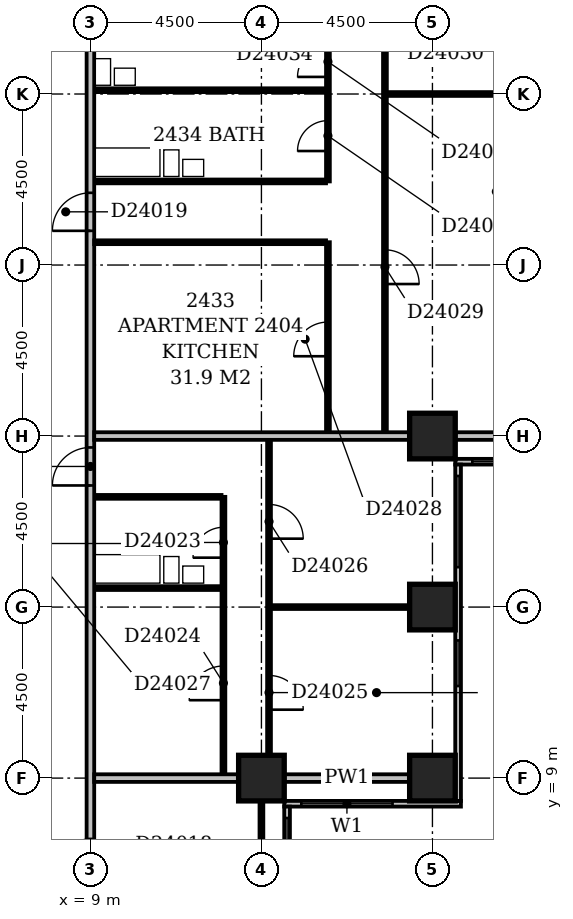
"""IFC4 building model, lengths in metres.
Left out: names, types, materials, properties, quantities, classifications, styles, units other than length and angle.
Written with IfcOpenShell. Run it as: python <this file> out.ifc"""

import sys

from ifc_helpers import new_model, si_unit, direction, frame, frame_2d, origin, origin_2d, place, context, subcontext, project, spatial, rectangle, extrude, element, fill, save


model = new_model("IFC4")
c1 = context("Model", 3, precision=1e-05, world=origin(), true_north=direction((0.0, 1.0)))
c2 = subcontext(c1, "Body", "Model", "MODEL_VIEW")
j1 = project(units=[si_unit("LENGTHUNIT", "METRE"), si_unit("PLANEANGLEUNIT", "RADIAN")], contexts=[c1])
p1 = place(None, origin())
s1 = spatial("IfcSite", under=j1, at=p1, CompositionType="ELEMENT")
p2 = place(p1, origin())
s2 = spatial("IfcBuilding", under=s1, at=p2, CompositionType="ELEMENT")
p3 = place(p2, frame((0.0, 0.0, 97.4)))
s3 = spatial("IfcBuildingStorey", under=s2, at=p3, CompositionType="ELEMENT", Elevation=97.4)
for number, where, z_axis, x_axis in (
    (1, (13.5, 9.0, -0.3), (0.0, 0.0, 1.0), (1.0, 0.0, 0.0)),
    (2, (18.0, 9.0, -0.3), (0.0, 0.0, 1.0), (1.0, 0.0, 0.0)),
    (3, (18.0, 13.5, -0.3), (0.0, 0.0, 1.0), (1.0, 0.0, 0.0)),
    (4, (18.0, 18.0, -0.3), (0.0, 0.0, 1.0), (1.0, 0.0, 0.0)),
):
    element("IfcColumn", number, at=place(p3, frame(where, z_axis=z_axis, x_axis=x_axis)), inside=s3, PredefinedType="COLUMN", context=c2, shape_type="SweptSolid", body=[
        extrude(rectangle(XDim=1.2, YDim=1.2, at=origin_2d()), origin(), (0.0, 0.0, 1.0), 3.6),
    ])
p4 = place(p3, frame((14.175, 3.9, 0.0), z_axis=(0.0, 0.0, 1.0), x_axis=(0.0, 1.0, 0.0)))
e5 = element("IfcWall", 5, at=p4, inside=s3, PredefinedType="STANDARD", context=c2, shape_type="SweptSolid", body=[
    extrude(rectangle(XDim=4.35, YDim=0.15, at=frame_2d((2.175, 0.0))), origin(), (0.0, 0.0, 1.0), 2.7),
])
p5 = place(p4, frame((1.65, 0.0, 0.6)))
e6 = element("IfcOpeningElement", 6, at=p5, cuts=e5, PredefinedType="OPENING", context=c2, shape_type="SweptSolid", body=[
    extrude(rectangle(XDim=2.4, YDim=1.8, at=frame_2d((1.2, 0.9))), frame((0.0, 0.087, 0.0), z_axis=(0.0, -1.0, 0.0), x_axis=(1.0, 0.0, 0.0)), (0.0, 0.0, 1.0), 0.174),
])
p6 = place(p3, frame((14.1, 8.325, 0.0), z_axis=(0.0, 0.0, 1.0), x_axis=(1.0, 0.0, 0.0)))
e7 = element("IfcWall", 7, at=p6, inside=s3, PredefinedType="STANDARD", context=c2, shape_type="SweptSolid", body=[
    extrude(rectangle(XDim=4.65, YDim=0.15, at=frame_2d((2.325, 0.0))), origin(), (0.0, 0.0, 1.0), 2.7),
])
p7 = place(p6, frame((0.45, 0.0, 0.6)))
e8 = element("IfcOpeningElement", 8, at=p7, cuts=e7, PredefinedType="OPENING", context=c2, shape_type="SweptSolid", body=[
    extrude(rectangle(XDim=2.4, YDim=1.8, at=frame_2d((1.2, 0.9))), frame((0.0, 0.087, 0.0), z_axis=(0.0, -1.0, 0.0), x_axis=(1.0, 0.0, 0.0)), (0.0, 0.0, 1.0), 0.174),
])
p8 = place(p3, frame((18.675, 8.4, 0.0), z_axis=(0.0, 0.0, 1.0), x_axis=(0.0, 1.0, 0.0)))
e9 = element("IfcWall", 9, at=p8, inside=s3, PredefinedType="STANDARD", context=c2, shape_type="SweptSolid", body=[
    extrude(rectangle(XDim=8.85, YDim=0.15, at=frame_2d((4.425, 0.0))), origin(), (0.0, 0.0, 1.0), 2.7),
])
p9 = place(p8, frame((3.022, 0.0, 0.6)))
e10 = element("IfcOpeningElement", 10, at=p9, cuts=e9, PredefinedType="OPENING", context=c2, shape_type="SweptSolid", body=[
    extrude(rectangle(XDim=1.2, YDim=1.8, at=frame_2d((0.6, 0.9))), frame((0.0, 0.087, 0.0), z_axis=(0.0, -1.0, 0.0), x_axis=(1.0, 0.0, 0.0)), (0.0, 0.0, 1.0), 0.174),
])
p10 = place(p8, frame((6.15, 0.0, 0.6)))
e11 = element("IfcOpeningElement", 11, at=p10, cuts=e9, PredefinedType="OPENING", context=c2, shape_type="SweptSolid", body=[
    extrude(rectangle(XDim=2.4, YDim=1.8, at=frame_2d((1.2, 0.9))), frame((0.0, 0.087, 0.0), z_axis=(0.0, -1.0, 0.0), x_axis=(1.0, 0.0, 0.0)), (0.0, 0.0, 1.0), 0.174),
])
p11 = place(p3, frame((18.6, 17.325, 0.0), z_axis=(0.0, 0.0, 1.0), x_axis=(1.0, 0.0, 0.0)))
e12 = element("IfcWall", 12, at=p11, inside=s3, PredefinedType="STANDARD", context=c2, shape_type="SweptSolid", body=[
    extrude(rectangle(XDim=4.65, YDim=0.15, at=frame_2d((2.325, 0.0))), origin(), (0.0, 0.0, 1.0), 2.7),
])
p12 = place(p11, frame((0.45, 0.0, 0.6)))
e13 = element("IfcOpeningElement", 13, at=p12, cuts=e12, PredefinedType="OPENING", context=c2, shape_type="SweptSolid", body=[
    extrude(rectangle(XDim=2.4, YDim=1.8, at=frame_2d((1.2, 0.9))), frame((0.0, 0.087, 0.0), z_axis=(0.0, -1.0, 0.0), x_axis=(1.0, 0.0, 0.0)), (0.0, 0.0, 1.0), 0.174),
])
p13 = place(p3, frame((9.0, 5.0, 0.0), z_axis=(0.0, 0.0, 1.0), x_axis=(0.0, 1.0, 0.0)))
e14 = element("IfcWall", 14, at=p13, inside=s3, PredefinedType="PARTITIONING", context=c2, shape_type="SweptSolid", body=[
    extrude(rectangle(XDim=44.5, YDim=0.2, at=frame_2d((22.25, 0.0))), origin(), (0.0, 0.0, 1.0), 3.3),
])
p14 = place(p13, frame((18.4, 0.0, 0.0)))
e15 = element("IfcOpeningElement", 15, at=p14, cuts=e14, PredefinedType="OPENING", context=c2, shape_type="SweptSolid", body=[
    extrude(rectangle(XDim=1.0, YDim=2.1, at=frame_2d((0.5, 1.05))), frame((0.0, 0.112, 0.0), z_axis=(0.0, -1.0, 0.0), x_axis=(1.0, 0.0, 0.0)), (0.0, 0.0, 1.0), 0.224),
])
p15 = place(p13, frame((11.7, 0.0, 0.0)))
e16 = element("IfcOpeningElement", 16, at=p15, cuts=e14, PredefinedType="OPENING", context=c2, shape_type="SweptSolid", body=[
    extrude(rectangle(XDim=1.0, YDim=2.1, at=frame_2d((0.5, 1.05))), frame((0.0, 0.112, 0.0), z_axis=(0.0, -1.0, 0.0), x_axis=(1.0, 0.0, 0.0)), (0.0, 0.0, 1.0), 0.224),
])
p16 = place(p13, frame((37.25, 0.0, 0.0)))
e17 = element("IfcOpeningElement", 17, at=p16, cuts=e14, PredefinedType="OPENING", context=c2, shape_type="SweptSolid", body=[
    extrude(rectangle(XDim=0.9, YDim=2.1, at=frame_2d((0.45, 1.05))), frame((0.0, 0.112, 0.0), z_axis=(0.0, -1.0, 0.0), x_axis=(1.0, 0.0, 0.0)), (0.0, 0.0, 1.0), 0.224),
])
p17 = place(p13, frame((1.5, 0.0, 0.0)))
e18 = element("IfcOpeningElement", 18, at=p17, cuts=e14, PredefinedType="OPENING", context=c2, shape_type="SweptSolid", body=[
    extrude(rectangle(XDim=0.9, YDim=2.1, at=frame_2d((0.45, 1.05))), frame((0.0, 0.112, 0.0), z_axis=(0.0, -1.0, 0.0), x_axis=(1.0, 0.0, 0.0)), (0.0, 0.0, 1.0), 0.224),
])
p18 = place(p3, frame((13.5, 5.1, 0.0), z_axis=(0.0, 0.0, 1.0), x_axis=(0.0, 1.0, 0.0)))
e19 = element("IfcWall", 19, at=p18, inside=s3, PredefinedType="PARTITIONING", context=c2, shape_type="SweptSolid", body=[
    extrude(rectangle(XDim=3.3, YDim=0.1, at=frame_2d((1.65, 0.0))), origin(), (0.0, 0.0, 1.0), 2.7),
])
p19 = place(p3, frame((9.1, 9.0, 0.0), z_axis=(0.0, 0.0, 1.0), x_axis=(1.0, 0.0, 0.0)))
e20 = element("IfcWall", 20, at=p19, inside=s3, PredefinedType="PARTITIONING", context=c2, shape_type="SweptSolid", body=[
    extrude(rectangle(XDim=3.8, YDim=0.2, at=frame_2d((1.9, 0.0))), origin(), (0.0, 0.0, 1.0), 3.3),
])
p20 = place(p3, frame((14.1, 9.0, 0.0), z_axis=(0.0, 0.0, 1.0), x_axis=(1.0, 0.0, 0.0)))
e21 = element("IfcWall", 21, at=p20, inside=s3, PredefinedType="PARTITIONING", context=c2, shape_type="SweptSolid", body=[
    extrude(rectangle(XDim=3.3, YDim=0.2, at=frame_2d((1.65, 0.0))), origin(), (0.0, 0.0, 1.0), 2.7),
])
p21 = place(p3, frame((12.5, 9.1, 0.0), z_axis=(0.0, 0.0, 1.0), x_axis=(0.0, 1.0, 0.0)))
e22 = element("IfcWall", 22, at=p21, inside=s3, PredefinedType="PARTITIONING", context=c2, shape_type="SweptSolid", body=[
    extrude(rectangle(XDim=7.3, YDim=0.1, at=frame_2d((3.65, 0.0))), origin(), (0.0, 0.0, 1.0), 3.3),
])
p22 = place(p21, frame((5.7, 0.0, 0.0)))
e23 = element("IfcOpeningElement", 23, at=p22, cuts=e22, PredefinedType="OPENING", context=c2, shape_type="SweptSolid", body=[
    extrude(rectangle(XDim=0.8, YDim=2.1, at=frame_2d((0.4, 1.05))), frame((0.0, 0.062, 0.0), z_axis=(0.0, -1.0, 0.0), x_axis=(1.0, 0.0, 0.0)), (0.0, 0.0, 1.0), 0.124),
])
p23 = place(p21, frame((1.95, 0.0, 0.0)))
e24 = element("IfcOpeningElement", 24, at=p23, cuts=e22, PredefinedType="OPENING", context=c2, shape_type="SweptSolid", body=[
    extrude(rectangle(XDim=0.9, YDim=2.1, at=frame_2d((0.45, 1.05))), frame((0.0, 0.062, 0.0), z_axis=(0.0, -1.0, 0.0), x_axis=(1.0, 0.0, 0.0)), (0.0, 0.0, 1.0), 0.124),
])
p24 = place(p3, frame((13.7, 9.6, 0.0), z_axis=(0.0, 0.0, 1.0), x_axis=(0.0, 1.0, 0.0)))
e25 = element("IfcWall", 25, at=p24, inside=s3, PredefinedType="PARTITIONING", context=c2, shape_type="SweptSolid", body=[
    extrude(rectangle(XDim=8.3, YDim=0.1, at=frame_2d((4.15, 0.0))), origin(), (0.0, 0.0, 1.0), 3.3),
])
p25 = place(p24, frame((1.2, 0.0, 0.0)))
e26 = element("IfcOpeningElement", 26, at=p25, cuts=e25, PredefinedType="OPENING", context=c2, shape_type="SweptSolid", body=[
    extrude(rectangle(XDim=0.9, YDim=2.1, at=frame_2d((0.45, 1.05))), frame((0.0, 0.062, 0.0), z_axis=(0.0, -1.0, 0.0), x_axis=(1.0, 0.0, 0.0)), (0.0, 0.0, 1.0), 0.124),
])
p26 = place(p24, frame((5.7, 0.0, 0.0)))
e27 = element("IfcOpeningElement", 27, at=p26, cuts=e25, PredefinedType="OPENING", context=c2, shape_type="SweptSolid", body=[
    extrude(rectangle(XDim=0.9, YDim=2.1, at=frame_2d((0.45, 1.05))), frame((0.0, 0.062, 0.0), z_axis=(0.0, -1.0, 0.0), x_axis=(1.0, 0.0, 0.0)), (0.0, 0.0, 1.0), 0.124),
])
p27 = place(p3, frame((13.75, 13.5, 0.0), z_axis=(0.0, 0.0, 1.0), x_axis=(1.0, 0.0, 0.0)))
e28 = element("IfcWall", 28, at=p27, inside=s3, PredefinedType="PARTITIONING", context=c2, shape_type="SweptSolid", body=[
    extrude(rectangle(XDim=3.65, YDim=0.1, at=frame_2d((1.825, 0.0))), origin(), (0.0, 0.0, 1.0), 3.3),
])
for number, where, z_axis, x_axis in (
    (29, (9.1, 14.0, 0.0), (0.0, 0.0, 1.0), (1.0, 0.0, 0.0)),
    (30, (9.1, 16.4, 0.0), (0.0, 0.0, 1.0), (1.0, 0.0, 0.0)),
):
    element("IfcWall", number, at=place(p3, frame(where, z_axis=z_axis, x_axis=x_axis)), inside=s3, PredefinedType="PLUMBINGWALL", context=c2, shape_type="SweptSolid", body=[
        extrude(rectangle(XDim=3.35, YDim=0.1, at=frame_2d((1.675, 0.0))), origin(), (0.0, 0.0, 1.0), 3.3),
    ])
p28 = place(p3, frame((9.1, 18.0, 0.0), z_axis=(0.0, 0.0, 1.0), x_axis=(1.0, 0.0, 0.0)))
e31 = element("IfcWall", 31, at=p28, inside=s3, PredefinedType="PARTITIONING", context=c2, shape_type="SweptSolid", body=[
    extrude(rectangle(XDim=8.3, YDim=0.2, at=frame_2d((4.15, 0.0))), origin(), (0.0, 0.0, 1.0), 2.6),
])
p29 = place(p3, frame((18.6, 18.0, 0.0), z_axis=(0.0, 0.0, 1.0), x_axis=(1.0, 0.0, 0.0)))
e32 = element("IfcWall", 32, at=p29, inside=s3, PredefinedType="PARTITIONING", context=c2, shape_type="SweptSolid", body=[
    extrude(rectangle(XDim=3.3, YDim=0.2, at=frame_2d((1.65, 0.0))), origin(), (0.0, 0.0, 1.0), 2.7),
])
p30 = place(p3, frame((15.25, 18.1, 0.0), z_axis=(0.0, 0.0, 1.0), x_axis=(0.0, 1.0, 0.0)))
e33 = element("IfcWall", 33, at=p30, inside=s3, PredefinedType="PARTITIONING", context=c2, shape_type="SweptSolid", body=[
    extrude(rectangle(XDim=5.0, YDim=0.1, at=frame_2d((2.5, 0.0))), origin(), (0.0, 0.0, 1.0), 3.3),
])
p31 = place(p30, frame((2.0, 0.0, 0.0)))
e34 = element("IfcOpeningElement", 34, at=p31, cuts=e33, PredefinedType="OPENING", context=c2, shape_type="SweptSolid", body=[
    extrude(rectangle(XDim=0.9, YDim=2.1, at=frame_2d((0.45, 1.05))), frame((0.0, 0.062, 0.0), z_axis=(0.0, -1.0, 0.0), x_axis=(1.0, 0.0, 0.0)), (0.0, 0.0, 1.0), 0.124),
])
p32 = place(p3, frame((16.75, 18.1, 0.0), z_axis=(0.0, 0.0, 1.0), x_axis=(0.0, 1.0, 0.0)))
e35 = element("IfcWall", 35, at=p32, inside=s3, PredefinedType="PARTITIONING", context=c2, shape_type="SweptSolid", body=[
    extrude(rectangle(XDim=17.8, YDim=0.1, at=frame_2d((8.9, 0.0))), origin(), (0.0, 0.0, 1.0), 3.3),
])
p33 = place(p32, frame((3.9, 0.0, 0.0)))
e36 = element("IfcOpeningElement", 36, at=p33, cuts=e35, PredefinedType="OPENING", context=c2, shape_type="SweptSolid", body=[
    extrude(rectangle(XDim=0.9, YDim=2.1, at=frame_2d((0.45, 1.05))), frame((0.0, 0.062, 0.0), z_axis=(0.0, -1.0, 0.0), x_axis=(1.0, 0.0, 0.0)), (0.0, 0.0, 1.0), 0.124),
])
p34 = place(p32, frame((10.7, 0.0, 0.0)))
e37 = element("IfcOpeningElement", 37, at=p34, cuts=e35, PredefinedType="OPENING", context=c2, shape_type="SweptSolid", body=[
    extrude(rectangle(XDim=0.9, YDim=2.1, at=frame_2d((0.45, 1.05))), frame((0.0, 0.062, 0.0), z_axis=(0.0, -1.0, 0.0), x_axis=(1.0, 0.0, 0.0)), (0.0, 0.0, 1.0), 0.124),
])
p35 = place(p32, frame((14.05, 0.0, 0.0)))
e38 = element("IfcOpeningElement", 38, at=p35, cuts=e35, PredefinedType="OPENING", context=c2, shape_type="SweptSolid", body=[
    extrude(rectangle(XDim=0.9, YDim=2.1, at=frame_2d((0.45, 1.05))), frame((0.0, 0.062, 0.0), z_axis=(0.0, -1.0, 0.0), x_axis=(1.0, 0.0, 0.0)), (0.0, 0.0, 1.0), 0.124),
])
p36 = place(p3, frame((9.1, 23.1, 0.0), z_axis=(0.0, 0.0, 1.0), x_axis=(1.0, 0.0, 0.0)))
e39 = element("IfcWall", 39, at=p36, inside=s3, PredefinedType="PARTITIONING", context=c2, shape_type="SweptSolid", body=[
    extrude(rectangle(XDim=6.1, YDim=0.1, at=frame_2d((3.05, 0.0))), origin(), (0.0, 0.0, 1.0), 3.3),
])
p37 = place(p3, frame((9.1, 24.7, 0.0), z_axis=(0.0, 0.0, 1.0), x_axis=(1.0, 0.0, 0.0)))
e40 = element("IfcWall", 40, at=p37, inside=s3, PredefinedType="PLUMBINGWALL", context=c2, shape_type="SweptSolid", body=[
    extrude(rectangle(XDim=6.1, YDim=0.1, at=frame_2d((3.05, 0.0))), origin(), (0.0, 0.0, 1.0), 3.3),
])
p38 = place(p3, frame((15.25, 24.7, 0.0), z_axis=(0.0, 0.0, 1.0), x_axis=(0.0, 1.0, 0.0)))
e41 = element("IfcWall", 41, at=p38, inside=s3, PredefinedType="PARTITIONING", context=c2, shape_type="SweptSolid", body=[
    extrude(rectangle(XDim=11.2, YDim=0.1, at=frame_2d((5.6, 0.0))), origin(), (0.0, 0.0, 1.0), 3.3),
])
p39 = place(p38, frame((0.8, 0.0, 0.0)))
e42 = element("IfcOpeningElement", 42, at=p39, cuts=e41, PredefinedType="OPENING", context=c2, shape_type="SweptSolid", body=[
    extrude(rectangle(XDim=0.8, YDim=2.1, at=frame_2d((0.4, 1.05))), frame((0.0, 0.062, 0.0), z_axis=(0.0, -1.0, 0.0), x_axis=(1.0, 0.0, 0.0)), (0.0, 0.0, 1.0), 0.124),
])
p40 = place(p38, frame((8.1, 0.0, 0.0)))
e43 = element("IfcOpeningElement", 43, at=p40, cuts=e41, PredefinedType="OPENING", context=c2, shape_type="SweptSolid", body=[
    extrude(rectangle(XDim=0.8, YDim=2.1, at=frame_2d((0.4, 1.05))), frame((0.0, 0.062, 0.0), z_axis=(0.0, -1.0, 0.0), x_axis=(1.0, 0.0, 0.0)), (0.0, 0.0, 1.0), 0.124),
])
p41 = place(p38, frame((4.3, 0.0, 0.0)))
e44 = element("IfcOpeningElement", 44, at=p41, cuts=e41, PredefinedType="OPENING", context=c2, shape_type="SweptSolid", body=[
    extrude(rectangle(XDim=0.8, YDim=2.1, at=frame_2d((0.4, 1.05))), frame((0.0, 0.062, 0.0), z_axis=(0.0, -1.0, 0.0), x_axis=(1.0, 0.0, 0.0)), (0.0, 0.0, 1.0), 0.124),
])
p42 = place(p38, frame((6.1, 0.0, 0.0)))
e45 = element("IfcOpeningElement", 45, at=p42, cuts=e41, PredefinedType="OPENING", context=c2, shape_type="SweptSolid", body=[
    extrude(rectangle(XDim=0.8, YDim=2.1, at=frame_2d((0.4, 1.05))), frame((0.0, 0.062, 0.0), z_axis=(0.0, -1.0, 0.0), x_axis=(1.0, 0.0, 0.0)), (0.0, 0.0, 1.0), 0.124),
])
p43 = place(p38, frame((10.0, 0.0, 0.0)))
e46 = element("IfcOpeningElement", 46, at=p43, cuts=e41, PredefinedType="OPENING", context=c2, shape_type="SweptSolid", body=[
    extrude(rectangle(XDim=0.8, YDim=2.1, at=frame_2d((0.4, 1.05))), frame((0.0, 0.062, 0.0), z_axis=(0.0, -1.0, 0.0), x_axis=(1.0, 0.0, 0.0)), (0.0, 0.0, 1.0), 0.124),
])
p44 = place(p38, frame((2.75, 0.0, 0.0)))
e47 = element("IfcOpeningElement", 47, at=p44, cuts=e41, PredefinedType="OPENING", context=c2, shape_type="SweptSolid", body=[
    extrude(rectangle(XDim=0.8, YDim=2.1, at=frame_2d((0.4, 1.05))), frame((0.0, 0.062, 0.0), z_axis=(0.0, -1.0, 0.0), x_axis=(1.0, 0.0, 0.0)), (0.0, 0.0, 1.0), 0.124),
])
p45 = place(p3, frame((16.8, 27.0, 0.0), z_axis=(0.0, 0.0, 1.0), x_axis=(1.0, 0.0, 0.0)))
e48 = element("IfcWall", 48, at=p45, inside=s3, PredefinedType="PARTITIONING", context=c2, shape_type="SweptSolid", body=[
    extrude(rectangle(XDim=5.1, YDim=0.1, at=frame_2d((2.55, 0.0))), origin(), (0.0, 0.0, 1.0), 2.7),
])
p46 = place(p3, frame((9.1, 27.1, 0.0), z_axis=(0.0, 0.0, 1.0), x_axis=(1.0, 0.0, 0.0)))
e49 = element("IfcWall", 49, at=p46, inside=s3, PredefinedType="PLUMBINGWALL", context=c2, shape_type="SweptSolid", body=[
    extrude(rectangle(XDim=6.1, YDim=0.1, at=frame_2d((3.05, 0.0))), origin(), (0.0, 0.0, 1.0), 2.7),
])
p47 = place(p5, origin())
e50 = element("IfcWindow", 50, at=p47, inside=s3, PartitioningType="SINGLE_PANEL", PredefinedType="WINDOW", context=c2, shape_type="SweptSolid", body=[
    extrude(rectangle(XDim=2.4, YDim=1.8, at=frame_2d((1.2, 0.9))), frame((0.0, 0.03, 0.0), z_axis=(0.0, -1.0, 0.0), x_axis=(1.0, 0.0, 0.0)), (0.0, 0.0, 1.0), 0.06),
])
fill(e6, e50)
p48 = place(p7, origin())
e51 = element("IfcWindow", 51, at=p48, inside=s3, PartitioningType="SINGLE_PANEL", PredefinedType="WINDOW", context=c2, shape_type="SweptSolid", body=[
    extrude(rectangle(XDim=2.4, YDim=1.8, at=frame_2d((1.2, 0.9))), frame((0.0, 0.03, 0.0), z_axis=(0.0, -1.0, 0.0), x_axis=(1.0, 0.0, 0.0)), (0.0, 0.0, 1.0), 0.06),
])
fill(e8, e51)
p49 = place(p9, origin())
e52 = element("IfcWindow", 52, at=p49, inside=s3, PartitioningType="SINGLE_PANEL", PredefinedType="WINDOW", context=c2, shape_type="SweptSolid", body=[
    extrude(rectangle(XDim=1.2, YDim=1.8, at=frame_2d((0.6, 0.9))), frame((0.0, 0.03, 0.0), z_axis=(0.0, -1.0, 0.0), x_axis=(1.0, 0.0, 0.0)), (0.0, 0.0, 1.0), 0.06),
])
fill(e10, e52)
p50 = place(p10, origin())
e53 = element("IfcWindow", 53, at=p50, inside=s3, PartitioningType="SINGLE_PANEL", PredefinedType="WINDOW", context=c2, shape_type="SweptSolid", body=[
    extrude(rectangle(XDim=2.4, YDim=1.8, at=frame_2d((1.2, 0.9))), frame((0.0, 0.03, 0.0), z_axis=(0.0, -1.0, 0.0), x_axis=(1.0, 0.0, 0.0)), (0.0, 0.0, 1.0), 0.06),
])
fill(e11, e53)
p51 = place(p12, origin())
e54 = element("IfcWindow", 54, at=p51, inside=s3, PartitioningType="SINGLE_PANEL", PredefinedType="WINDOW", context=c2, shape_type="SweptSolid", body=[
    extrude(rectangle(XDim=2.4, YDim=1.8, at=frame_2d((1.2, 0.9))), frame((0.0, 0.03, 0.0), z_axis=(0.0, -1.0, 0.0), x_axis=(1.0, 0.0, 0.0)), (0.0, 0.0, 1.0), 0.06),
])
fill(e13, e54)
p52 = place(p14, origin())
e55 = element("IfcDoor", 55, at=p52, inside=s3, OperationType="SINGLE_SWING_LEFT", PredefinedType="DOOR", context=c2, shape_type="SweptSolid", body=[
    extrude(rectangle(XDim=1.0, YDim=2.1, at=frame_2d((0.5, 1.05))), frame((0.0, 0.025, 0.0), z_axis=(0.0, -1.0, 0.0), x_axis=(1.0, 0.0, 0.0)), (0.0, 0.0, 1.0), 0.05),
])
fill(e15, e55)
p53 = place(p15, origin())
e56 = element("IfcDoor", 56, at=p53, inside=s3, OperationType="SINGLE_SWING_LEFT", PredefinedType="DOOR", context=c2, shape_type="SweptSolid", body=[
    extrude(rectangle(XDim=1.0, YDim=2.1, at=frame_2d((0.5, 1.05))), frame((0.0, 0.025, 0.0), z_axis=(0.0, -1.0, 0.0), x_axis=(1.0, 0.0, 0.0)), (0.0, 0.0, 1.0), 0.05),
])
fill(e16, e56)
p54 = place(p22, origin())
e57 = element("IfcDoor", 57, at=p54, inside=s3, OperationType="SINGLE_SWING_LEFT", PredefinedType="DOOR", context=c2, shape_type="SweptSolid", body=[
    extrude(rectangle(XDim=0.8, YDim=2.1, at=frame_2d((0.4, 1.05))), frame((0.0, 0.025, 0.0), z_axis=(0.0, -1.0, 0.0), x_axis=(1.0, 0.0, 0.0)), (0.0, 0.0, 1.0), 0.05),
])
fill(e23, e57)
p55 = place(p23, origin())
e58 = element("IfcDoor", 58, at=p55, inside=s3, OperationType="SINGLE_SWING_LEFT", PredefinedType="DOOR", context=c2, shape_type="SweptSolid", body=[
    extrude(rectangle(XDim=0.9, YDim=2.1, at=frame_2d((0.45, 1.05))), frame((0.0, 0.025, 0.0), z_axis=(0.0, -1.0, 0.0), x_axis=(1.0, 0.0, 0.0)), (0.0, 0.0, 1.0), 0.05),
])
fill(e24, e58)
p56 = place(p25, frame((0.9, 0.0, 0.0), z_axis=(0.0, 0.0, 1.0), x_axis=(-1.0, 0.0, 0.0)))
e59 = element("IfcDoor", 59, at=p56, inside=s3, OperationType="SINGLE_SWING_RIGHT", PredefinedType="DOOR", context=c2, shape_type="SweptSolid", body=[
    extrude(rectangle(XDim=0.9, YDim=2.1, at=frame_2d((0.45, 1.05))), frame((0.0, 0.025, 0.0), z_axis=(0.0, -1.0, 0.0), x_axis=(1.0, 0.0, 0.0)), (0.0, 0.0, 1.0), 0.05),
])
fill(e26, e59)
p57 = place(p26, frame((0.9, 0.0, 0.0), z_axis=(0.0, 0.0, 1.0), x_axis=(-1.0, 0.0, 0.0)))
e60 = element("IfcDoor", 60, at=p57, inside=s3, OperationType="SINGLE_SWING_RIGHT", PredefinedType="DOOR", context=c2, shape_type="SweptSolid", body=[
    extrude(rectangle(XDim=0.9, YDim=2.1, at=frame_2d((0.45, 1.05))), frame((0.0, 0.025, 0.0), z_axis=(0.0, -1.0, 0.0), x_axis=(1.0, 0.0, 0.0)), (0.0, 0.0, 1.0), 0.05),
])
fill(e27, e60)
p58 = place(p31, origin())
e61 = element("IfcDoor", 61, at=p58, inside=s3, OperationType="SINGLE_SWING_LEFT", PredefinedType="DOOR", context=c2, shape_type="SweptSolid", body=[
    extrude(rectangle(XDim=0.9, YDim=2.1, at=frame_2d((0.45, 1.05))), frame((0.0, 0.025, 0.0), z_axis=(0.0, -1.0, 0.0), x_axis=(1.0, 0.0, 0.0)), (0.0, 0.0, 1.0), 0.05),
])
fill(e34, e61)
p59 = place(p33, frame((0.9, 0.0, 0.0), z_axis=(0.0, 0.0, 1.0), x_axis=(-1.0, 0.0, 0.0)))
e62 = element("IfcDoor", 62, at=p59, inside=s3, OperationType="SINGLE_SWING_RIGHT", PredefinedType="DOOR", context=c2, shape_type="SweptSolid", body=[
    extrude(rectangle(XDim=0.9, YDim=2.1, at=frame_2d((0.45, 1.05))), frame((0.0, 0.025, 0.0), z_axis=(0.0, -1.0, 0.0), x_axis=(1.0, 0.0, 0.0)), (0.0, 0.0, 1.0), 0.05),
])
fill(e36, e62)
p60 = place(p39, origin())
e63 = element("IfcDoor", 63, at=p60, inside=s3, OperationType="SINGLE_SWING_LEFT", PredefinedType="DOOR", context=c2, shape_type="SweptSolid", body=[
    extrude(rectangle(XDim=0.8, YDim=2.1, at=frame_2d((0.4, 1.05))), frame((0.0, 0.025, 0.0), z_axis=(0.0, -1.0, 0.0), x_axis=(1.0, 0.0, 0.0)), (0.0, 0.0, 1.0), 0.05),
])
fill(e42, e63)
p61 = place(p44, origin())
e64 = element("IfcDoor", 64, at=p61, inside=s3, OperationType="SINGLE_SWING_LEFT", PredefinedType="DOOR", context=c2, shape_type="SweptSolid", body=[
    extrude(rectangle(XDim=0.8, YDim=2.1, at=frame_2d((0.4, 1.05))), frame((0.0, 0.025, 0.0), z_axis=(0.0, -1.0, 0.0), x_axis=(1.0, 0.0, 0.0)), (0.0, 0.0, 1.0), 0.05),
])
fill(e47, e64)
save(model, sys.argv[1])
